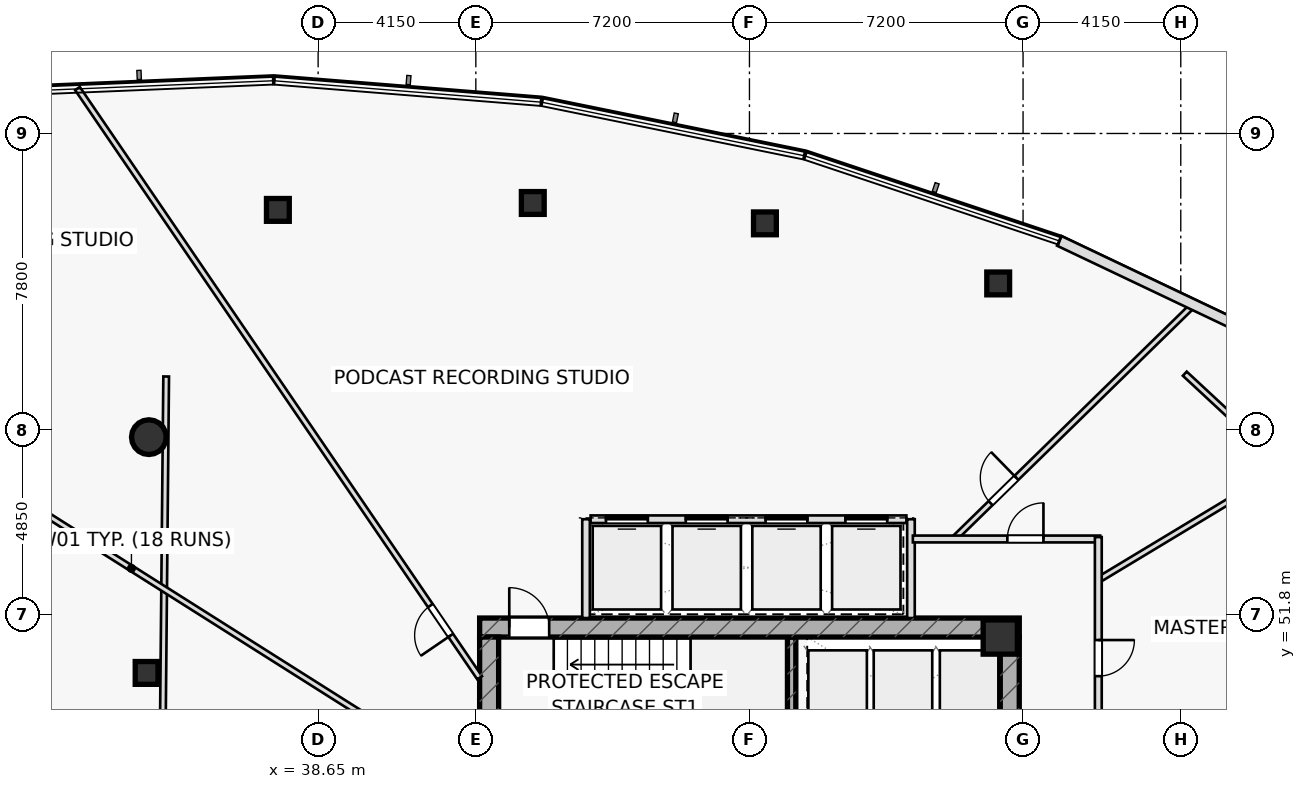
"""IFC4 building model, lengths in metres.
Left out: names, types, materials, properties, quantities, classifications, styles, units other than length and angle.
Written with IfcOpenShell. Run it as: python <this file> out.ifc"""

import sys

from ifc_helpers import new_model, si_unit, direction, frame, frame_2d, origin, origin_2d, place, context, subcontext, project, spatial, rectangle, hollow_rectangle, hollow_circle, extrude, element, fill, save


model = new_model("IFC4")
c1 = context("Model", 3, precision=1e-05, world=origin(), true_north=direction((0.0, 1.0)))
c2 = subcontext(c1, "Body", "Model", "MODEL_VIEW")
j1 = project(units=[si_unit("LENGTHUNIT", "METRE"), si_unit("PLANEANGLEUNIT", "RADIAN")], contexts=[c1])
p1 = place(None, origin())
s1 = spatial("IfcSite", under=j1, at=p1, CompositionType="ELEMENT")
p2 = place(p1, origin())
s2 = spatial("IfcBuilding", under=s1, at=p2, CompositionType="ELEMENT")
p3 = place(p2, frame((0.0, 0.0, 230.05)))
s3 = spatial("IfcBuildingStorey", under=s2, at=p3, CompositionType="ELEMENT", Elevation=230.05)
p4 = place(p3, frame((51.11, 48.1, 0.0), z_axis=(0.0, 0.0, 1.0), x_axis=(0.0, 1.0, 0.0)))
e1 = element("IfcWall", 1, at=p4, inside=s3, PredefinedType="SHEAR", context=c2, shape_type="SweptSolid", body=[
    extrude(rectangle(XDim=3.1, YDim=0.22, at=frame_2d((1.55, 0.0))), origin(), (0.0, 0.0, 1.0), 3.65),
])
p5 = place(p3, frame((42.9, 51.45, 0.0), z_axis=(0.0, 0.0, 1.0), x_axis=(1.0, 0.0, 0.0)))
e2 = element("IfcWall", 2, at=p5, inside=s3, PredefinedType="SHEAR", context=c2, shape_type="SweptSolid", body=[
    extrude(rectangle(XDim=14.2, YDim=0.5, at=frame_2d((7.1, 0.0))), origin(), (0.0, 0.0, 1.0), 3.65),
])
p6 = place(p5, frame((0.78, 0.0, 0.0)))
e3 = element("IfcOpeningElement", 3, at=p6, cuts=e2, PredefinedType="OPENING", context=c2, shape_type="SweptSolid", body=[
    extrude(rectangle(XDim=1.05, YDim=2.2, at=frame_2d((0.525, 1.1))), frame((0.0, 0.26, 0.0), z_axis=(0.0, -1.0, 0.0), x_axis=(1.0, 0.0, 0.0)), (0.0, 0.0, 1.0), 0.52),
])
p7 = place(p3, frame((43.15, 38.8, 0.0), z_axis=(0.0, 0.0, 1.0), x_axis=(0.0, 1.0, 0.0)))
e4 = element("IfcWall", 4, at=p7, inside=s3, PredefinedType="SHEAR", context=c2, shape_type="SweptSolid", body=[
    extrude(rectangle(XDim=12.4, YDim=0.5, at=frame_2d((6.2, 0.0))), origin(), (0.0, 0.0, 1.0), 3.65),
])
p8 = place(p3, frame((56.85, 38.8, 0.0), z_axis=(0.0, 0.0, 1.0), x_axis=(0.0, 1.0, 0.0)))
e5 = element("IfcWall", 5, at=p8, inside=s3, PredefinedType="SHEAR", context=c2, shape_type="SweptSolid", body=[
    extrude(rectangle(XDim=12.4, YDim=0.5, at=frame_2d((6.2, 0.0))), origin(), (0.0, 0.0, 1.0), 3.65),
])
p9 = place(p8, frame((3.85, 0.0, 0.0)))
e6 = element("IfcOpeningElement", 6, at=p9, cuts=e5, PredefinedType="OPENING", context=c2, shape_type="SweptSolid", body=[
    extrude(rectangle(XDim=1.5, YDim=2.2, at=frame_2d((0.75, 1.1))), frame((0.0, 0.26, 0.0), z_axis=(0.0, -1.0, 0.0), x_axis=(1.0, 0.0, 0.0)), (0.0, 0.0, 1.0), 0.52),
])
p10 = place(p3, frame((56.6, 51.2, 0.0), z_axis=(0.0, 0.0, 1.0), x_axis=(1.0, 0.0, 0.0)))
e7 = element("IfcColumn", 7, at=p10, inside=s3, PredefinedType="COLUMN", context=c2, shape_type="SweptSolid", body=[
    extrude(rectangle(XDim=0.9, YDim=0.9, at=origin_2d()), origin(), (0.0, 0.0, 1.0), 3.65),
])
p11 = place(p3, frame((34.196, 56.46, 0.0), z_axis=(0.0, 0.0, 1.0), x_axis=(1.0, 0.0, 0.0)))
e8 = element("IfcColumn", 8, at=p11, inside=s3, PredefinedType="COLUMN", context=c2, shape_type="SweptSolid", body=[
    extrude(hollow_circle(Radius=0.457, WallThickness=0.04, at=origin_2d()), origin(), (0.0, 0.0, 1.0), 3.65),
])
for number, where, z_axis, x_axis in (
    (9, (34.137, 50.256, 0.0), (0.0, 0.0, 1.0), (1.0, 0.0, 0.0)),
    (10, (56.546, 60.504, 0.0), (0.0, 0.0, 1.0), (1.0, 0.0, 0.0)),
    (11, (50.407, 62.085, 0.0), (0.0, 0.0, 1.0), (1.0, 0.0, 0.0)),
    (12, (44.299, 62.621, 0.0), (0.0, 0.0, 1.0), (1.0, 0.0, 0.0)),
    (13, (37.591, 62.439, 0.0), (0.0, 0.0, 1.0), (1.0, 0.0, 0.0)),
):
    element("IfcColumn", number, at=place(p3, frame(where, z_axis=z_axis, x_axis=x_axis)), inside=s3, PredefinedType="COLUMN", context=c2, shape_type="SweptSolid", body=[
        extrude(hollow_rectangle(XDim=0.6, YDim=0.6, WallThickness=0.036, at=origin_2d()), origin(), (0.0, 0.0, 1.0), 3.65),
    ])
for number, where, z_axis, x_axis in (
    (14, (45.7, 51.7, 0.0), (0.0, 0.0, 1.0), (0.0, 1.0, 0.0)),
    (15, (54.25, 51.7, 0.0), (0.0, 0.0, 1.0), (0.0, 1.0, 0.0)),
):
    element("IfcWall", number, at=place(p3, frame(where, z_axis=z_axis, x_axis=x_axis)), inside=s3, PredefinedType="PARTITIONING", context=c2, shape_type="SweptSolid", body=[
        extrude(rectangle(XDim=2.6, YDim=0.2, at=frame_2d((1.3, 0.0))), origin(), (0.0, 0.0, 1.0), 3.65),
    ])
p12 = place(p3, frame((34.652, 58.056, 0.0), z_axis=(0.0, 0.0, 1.0), x_axis=(-0.009553538759, -0.999954363907, 0.0)))
e16 = element("IfcWall", 16, at=p12, inside=s3, PredefinedType="PARTITIONING", context=c2, shape_type="SweptSolid", body=[
    extrude(rectangle(XDim=9.404, YDim=0.15, at=frame_2d((4.702, 0.0))), origin(), (0.0, 0.0, 1.0), 3.135),
])
p13 = place(p3, frame((69.792, 50.388, 0.0), z_axis=(0.0, 0.0, 1.0), x_axis=(-0.732769799181, 0.680476613418, 0.0)))
e17 = element("IfcWall", 17, at=p13, inside=s3, PredefinedType="PARTITIONING", context=c2, shape_type="SweptSolid", body=[
    extrude(rectangle(XDim=11.378, YDim=0.15, at=frame_2d((5.689, 0.0))), origin(), (0.0, 0.0, 1.0), 3.025),
])
p14 = place(p3, frame((59.18, 52.703, 0.0), z_axis=(0.0, 0.0, 1.0), x_axis=(0.856455315382, 0.516221166511, 0.0)))
e18 = element("IfcWall", 18, at=p14, inside=s3, PredefinedType="PARTITIONING", context=c2, shape_type="SweptSolid", body=[
    extrude(rectangle(XDim=8.776, YDim=0.15, at=frame_2d((4.388, 0.0))), origin(), (0.0, 0.0, 1.0), 3.135),
])
p15 = place(p3, frame((55.38, 53.78, 0.0), z_axis=(0.0, 0.0, 1.0), x_axis=(0.715025713102, 0.699098154484, 0.0)))
e19 = element("IfcWall", 19, at=p15, inside=s3, PredefinedType="PARTITIONING", context=c2, shape_type="SweptSolid", body=[
    extrude(rectangle(XDim=8.829, YDim=0.15, at=frame_2d((4.415, 0.0))), origin(), (0.0, 0.0, 1.0), 3.025),
])
p16 = place(p15, frame((1.35, 0.0, 0.0)))
e20 = element("IfcOpeningElement", 20, at=p16, cuts=e19, PredefinedType="OPENING", context=c2, shape_type="SweptSolid", body=[
    extrude(rectangle(XDim=0.95, YDim=2.05, at=frame_2d((0.475, 1.025))), frame((0.0, 0.085, 0.0), z_axis=(0.0, -1.0, 0.0), x_axis=(1.0, 0.0, 0.0)), (0.0, 0.0, 1.0), 0.17),
])
p17 = place(p3, frame((42.9, 50.128, 0.0), z_axis=(0.0, 0.0, 1.0), x_axis=(-0.563742719505, 0.825950450212, 0.0)))
e21 = element("IfcWall", 21, at=p17, inside=s3, PredefinedType="PARTITIONING", context=c2, shape_type="SweptSolid", body=[
    extrude(rectangle(XDim=18.773, YDim=0.15, at=frame_2d((9.386, 0.0))), origin(), (0.0, 0.0, 1.0), 3.025),
])
p18 = place(p17, frame((1.35, 0.0, 0.0)))
e22 = element("IfcOpeningElement", 22, at=p18, cuts=e21, PredefinedType="OPENING", context=c2, shape_type="SweptSolid", body=[
    extrude(rectangle(XDim=0.95, YDim=2.05, at=frame_2d((0.475, 1.025))), frame((0.0, 0.085, 0.0), z_axis=(0.0, -1.0, 0.0), x_axis=(1.0, 0.0, 0.0)), (0.0, 0.0, 1.0), 0.17),
])
p19 = place(p3, frame((41.75, 47.94, 0.0), z_axis=(0.0, 0.0, 1.0), x_axis=(-0.845214636511, 0.534426999905, 0.0)))
e23 = element("IfcWall", 23, at=p19, inside=s3, PredefinedType="PARTITIONING", context=c2, shape_type="SweptSolid", body=[
    extrude(rectangle(XDim=18.96, YDim=0.15, at=frame_2d((9.48, 0.0))), origin(), (0.0, 0.0, 1.0), 3.025),
])
p20 = place(p3, frame((54.3, 53.78, 0.0), z_axis=(0.0, 0.0, 1.0), x_axis=(1.0, 0.0, 0.0)))
e24 = element("IfcWall", 24, at=p20, inside=s3, PredefinedType="PARTITIONING", context=c2, shape_type="SweptSolid", body=[
    extrude(rectangle(XDim=4.93, YDim=0.18, at=frame_2d((2.465, 0.0))), origin(), (0.0, 0.0, 1.0), 3.65),
])
p21 = place(p20, frame((2.486, 0.0, 0.0)))
e25 = element("IfcOpeningElement", 25, at=p21, cuts=e24, PredefinedType="OPENING", context=c2, shape_type="SweptSolid", body=[
    extrude(rectangle(XDim=0.95, YDim=2.05, at=frame_2d((0.475, 1.025))), frame((0.0, 0.1, 0.0), z_axis=(0.0, -1.0, 0.0), x_axis=(1.0, 0.0, 0.0)), (0.0, 0.0, 1.0), 0.2),
])
p22 = place(p3, frame((59.18, 53.83, 0.0), z_axis=(0.0, 0.0, 1.0), x_axis=(0.0, -1.0, 0.0)))
e26 = element("IfcWall", 26, at=p22, inside=s3, PredefinedType="PARTITIONING", context=c2, shape_type="SweptSolid", body=[
    extrude(rectangle(XDim=5.53, YDim=0.18, at=frame_2d((2.765, 0.0))), origin(), (0.0, 0.0, 1.0), 3.65),
])
p23 = place(p22, frame((2.709, 0.0, 0.0)))
e27 = element("IfcOpeningElement", 27, at=p23, cuts=e26, PredefinedType="OPENING", context=c2, shape_type="SweptSolid", body=[
    extrude(rectangle(XDim=0.95, YDim=2.05, at=frame_2d((0.475, 1.025))), frame((0.0, 0.1, 0.0), z_axis=(0.0, -1.0, 0.0), x_axis=(1.0, 0.0, 0.0)), (0.0, 0.0, 1.0), 0.2),
])
p24 = place(p3, frame((64.555, 58.581, 0.0), z_axis=(0.0, 0.0, 1.0), x_axis=(-0.903144953619, 0.429335757598, 0.0)))
e28 = element("IfcWall", 28, at=p24, inside=s3, PredefinedType="STANDARD", context=c2, shape_type="SweptSolid", body=[
    extrude(rectangle(XDim=7.087, YDim=0.28, at=frame_2d((3.543, 0.0))), origin(), (0.0, 0.0, 1.0), 3.65),
])
p25 = place(p3, frame((45.82, 54.3, 0.0), z_axis=(0.0, 0.0, 1.0), x_axis=(1.0, 0.0, 0.0)))
e29 = element("IfcWall", 29, at=p25, inside=s3, PredefinedType="PARTITIONING", context=c2, shape_type="SweptSolid", body=[
    extrude(rectangle(XDim=8.31, YDim=0.2, at=frame_2d((4.155, 0.0))), origin(), (0.0, 0.0, 1.0), 3.65),
])
p26 = place(p25, frame((0.405, 0.0, 0.0)))
e30 = element("IfcOpeningElement", 30, at=p26, cuts=e29, PredefinedType="OPENING", context=c2, shape_type="SweptSolid", body=[
    extrude(rectangle(XDim=1.1, YDim=2.15, at=frame_2d((0.55, 1.075))), frame((0.0, 0.11, 0.0), z_axis=(0.0, -1.0, 0.0), x_axis=(1.0, 0.0, 0.0)), (0.0, 0.0, 1.0), 0.22),
])
p27 = place(p25, frame((2.505, 0.0, 0.0)))
e31 = element("IfcOpeningElement", 31, at=p27, cuts=e29, PredefinedType="OPENING", context=c2, shape_type="SweptSolid", body=[
    extrude(rectangle(XDim=1.1, YDim=2.15, at=frame_2d((0.55, 1.075))), frame((0.0, 0.11, 0.0), z_axis=(0.0, -1.0, 0.0), x_axis=(1.0, 0.0, 0.0)), (0.0, 0.0, 1.0), 0.22),
])
p28 = place(p25, frame((4.605, 0.0, 0.0)))
e32 = element("IfcOpeningElement", 32, at=p28, cuts=e29, PredefinedType="OPENING", context=c2, shape_type="SweptSolid", body=[
    extrude(rectangle(XDim=1.1, YDim=2.15, at=frame_2d((0.55, 1.075))), frame((0.0, 0.11, 0.0), z_axis=(0.0, -1.0, 0.0), x_axis=(1.0, 0.0, 0.0)), (0.0, 0.0, 1.0), 0.22),
])
p29 = place(p25, frame((6.705, 0.0, 0.0)))
e33 = element("IfcOpeningElement", 33, at=p29, cuts=e29, PredefinedType="OPENING", context=c2, shape_type="SweptSolid", body=[
    extrude(rectangle(XDim=1.1, YDim=2.15, at=frame_2d((0.55, 1.075))), frame((0.0, 0.11, 0.0), z_axis=(0.0, -1.0, 0.0), x_axis=(1.0, 0.0, 0.0)), (0.0, 0.0, 1.0), 0.22),
])
p30 = place(p6, origin())
e34 = element("IfcDoor", 34, at=p30, inside=s3, OperationType="SINGLE_SWING_LEFT", PredefinedType="DOOR", context=c2, shape_type="SweptSolid", body=[
    extrude(rectangle(XDim=1.05, YDim=2.2, at=frame_2d((0.525, 1.1))), frame((0.0, 0.025, 0.0), z_axis=(0.0, -1.0, 0.0), x_axis=(1.0, 0.0, 0.0)), (0.0, 0.0, 1.0), 0.05),
])
fill(e3, e34)
p31 = place(p16, origin())
e35 = element("IfcDoor", 35, at=p31, inside=s3, OperationType="SINGLE_SWING_RIGHT", PredefinedType="DOOR", context=c2, shape_type="SweptSolid", body=[
    extrude(rectangle(XDim=0.95, YDim=2.05, at=frame_2d((0.475, 1.025))), frame((0.0, 0.025, 0.0), z_axis=(0.0, -1.0, 0.0), x_axis=(1.0, 0.0, 0.0)), (0.0, 0.0, 1.0), 0.05),
])
fill(e20, e35)
p32 = place(p18, origin())
e36 = element("IfcDoor", 36, at=p32, inside=s3, OperationType="SINGLE_SWING_LEFT", PredefinedType="DOOR", context=c2, shape_type="SweptSolid", body=[
    extrude(rectangle(XDim=0.95, YDim=2.05, at=frame_2d((0.475, 1.025))), frame((0.0, 0.025, 0.0), z_axis=(0.0, -1.0, 0.0), x_axis=(1.0, 0.0, 0.0)), (0.0, 0.0, 1.0), 0.05),
])
fill(e22, e36)
p33 = place(p21, origin())
e37 = element("IfcDoor", 37, at=p33, inside=s3, OperationType="SINGLE_SWING_RIGHT", PredefinedType="DOOR", context=c2, shape_type="SweptSolid", body=[
    extrude(rectangle(XDim=0.95, YDim=2.05, at=frame_2d((0.475, 1.025))), frame((0.0, 0.025, 0.0), z_axis=(0.0, -1.0, 0.0), x_axis=(1.0, 0.0, 0.0)), (0.0, 0.0, 1.0), 0.05),
])
fill(e25, e37)
p34 = place(p23, origin())
e38 = element("IfcDoor", 38, at=p34, inside=s3, OperationType="SINGLE_SWING_LEFT", PredefinedType="DOOR", context=c2, shape_type="SweptSolid", body=[
    extrude(rectangle(XDim=0.95, YDim=2.05, at=frame_2d((0.475, 1.025))), frame((0.0, 0.025, 0.0), z_axis=(0.0, -1.0, 0.0), x_axis=(1.0, 0.0, 0.0)), (0.0, 0.0, 1.0), 0.05),
])
fill(e27, e38)
p35 = place(p26, origin())
e39 = element("IfcDoor", 39, at=p35, inside=s3, OperationType="SLIDING_TO_LEFT", PredefinedType="DOOR", context=c2, shape_type="SweptSolid", body=[
    extrude(rectangle(XDim=1.1, YDim=2.15, at=frame_2d((0.55, 1.075))), frame((0.0, 0.025, 0.0), z_axis=(0.0, -1.0, 0.0), x_axis=(1.0, 0.0, 0.0)), (0.0, 0.0, 1.0), 0.05),
])
fill(e30, e39)
p36 = place(p27, origin())
e40 = element("IfcDoor", 40, at=p36, inside=s3, OperationType="SLIDING_TO_RIGHT", PredefinedType="DOOR", context=c2, shape_type="SweptSolid", body=[
    extrude(rectangle(XDim=1.1, YDim=2.15, at=frame_2d((0.55, 1.075))), frame((0.0, 0.025, 0.0), z_axis=(0.0, -1.0, 0.0), x_axis=(1.0, 0.0, 0.0)), (0.0, 0.0, 1.0), 0.05),
])
fill(e31, e40)
p37 = place(p28, origin())
e41 = element("IfcDoor", 41, at=p37, inside=s3, OperationType="SLIDING_TO_LEFT", PredefinedType="DOOR", context=c2, shape_type="SweptSolid", body=[
    extrude(rectangle(XDim=1.1, YDim=2.15, at=frame_2d((0.55, 1.075))), frame((0.0, 0.025, 0.0), z_axis=(0.0, -1.0, 0.0), x_axis=(1.0, 0.0, 0.0)), (0.0, 0.0, 1.0), 0.05),
])
fill(e32, e41)
p38 = place(p29, origin())
e42 = element("IfcDoor", 42, at=p38, inside=s3, OperationType="SLIDING_TO_RIGHT", PredefinedType="DOOR", context=c2, shape_type="SweptSolid", body=[
    extrude(rectangle(XDim=1.1, YDim=2.15, at=frame_2d((0.55, 1.075))), frame((0.0, 0.025, 0.0), z_axis=(0.0, -1.0, 0.0), x_axis=(1.0, 0.0, 0.0)), (0.0, 0.0, 1.0), 0.05),
])
fill(e33, e42)
save(model, sys.argv[1])
